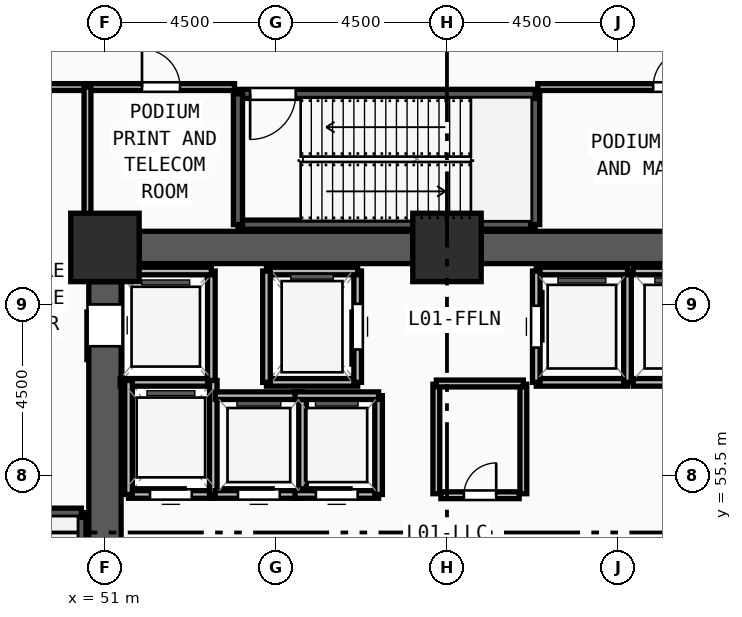
"""IFC4 building model, lengths in metres.
Left out: names, types, materials, properties, quantities, classifications, styles, units other than length and angle.
Written with IfcOpenShell. Run it as: python <this file> out.ifc"""

import sys

from ifc_helpers import new_model, si_unit, direction, frame, frame_2d, origin, origin_2d, place, context, subcontext, project, spatial, rectangle, extrude, source, transform, mapped, element, fill, save


model = new_model("IFC4")
c1 = context("Model", 3, precision=1e-05, world=origin(), true_north=direction((0.0, 1.0)))
c2 = subcontext(c1, "Body", "Model", "MODEL_VIEW")
j1 = project(units=[si_unit("LENGTHUNIT", "METRE"), si_unit("PLANEANGLEUNIT", "RADIAN")], contexts=[c1])
p1 = place(None, origin())
s1 = spatial("IfcSite", under=j1, at=p1, CompositionType="ELEMENT")
p2 = place(p1, origin())
s2 = spatial("IfcBuilding", under=s1, at=p2, CompositionType="ELEMENT")
p3 = place(p2, origin())
s3 = spatial("IfcBuildingStorey", under=s2, at=p3, CompositionType="ELEMENT", Elevation=0.0)
m1 = source(origin(), c2, "Body", "SweptSolid", [
    extrude(rectangle(XDim=1.8, YDim=1.8, at=origin_2d()), origin(), (0.0, 0.0, 1.0), 5.4),
])
for number, where, z_axis, x_axis in (
    (1, (60.0, 61.5, 0.0), (0.0, 0.0, 1.0), (1.0, 0.0, 0.0)),
    (2, (51.0, 61.5, 0.0), (0.0, 0.0, 1.0), (1.0, 0.0, 0.0)),
):
    element("IfcColumn", number, at=place(p3, frame(where, z_axis=z_axis, x_axis=x_axis)), inside=s3, PredefinedType="COLUMN", context=c2, shape_type="MappedRepresentation", body=[
        mapped(m1, transform((0.0, 0.0, 0.0), x_axis=(1.0, 0.0, 0.0), y_axis=(0.0, 1.0, 0.0), z_axis=(0.0, 0.0, 1.0), scale=1.0)),
    ])
for number, where, z_axis, x_axis in (
    (3, (51.9, 61.5, 0.0), (0.0, 0.0, 1.0), (1.0, 0.0, 0.0)),
    (4, (60.9, 61.5, 0.0), (0.0, 0.0, 1.0), (1.0, 0.0, 0.0)),
):
    element("IfcWall", number, at=place(p3, frame(where, z_axis=z_axis, x_axis=x_axis)), inside=s3, PredefinedType="SHEAR", context=c2, shape_type="SweptSolid", body=[
        extrude(rectangle(XDim=7.2, YDim=0.85, at=frame_2d((3.6, 0.0))), origin(), (0.0, 0.0, 1.0), 5.15),
    ])
p4 = place(p3, frame((51.0, 47.4, 0.0), z_axis=(0.0, 0.0, 1.0), x_axis=(0.0, 1.0, 0.0)))
e5 = element("IfcWall", 5, at=p4, inside=s3, PredefinedType="SHEAR", context=c2, shape_type="SweptSolid", body=[
    extrude(rectangle(XDim=13.2, YDim=0.85, at=frame_2d((6.6, 0.0))), origin(), (0.0, 0.0, 1.0), 5.15),
])
m2 = source(origin(), c2, "Body", "SweptSolid", [
    extrude(rectangle(XDim=1.1, YDim=2.2, at=frame_2d((0.55, 1.1))), frame((0.0, 0.435, 0.0), z_axis=(0.0, -1.0, 0.0), x_axis=(1.0, 0.0, 0.0)), (0.0, 0.0, 1.0), 0.87),
])
p5 = place(p4, frame((11.5, 0.0, 0.0)))
e6 = element("IfcOpeningElement", 6, at=p5, cuts=e5, PredefinedType="OPENING", context=c2, shape_type="MappedRepresentation", body=[
    mapped(m2, transform((0.0, 0.0, 0.0), x_axis=(1.0, 0.0, 0.0), y_axis=(0.0, 1.0, 0.0), z_axis=(0.0, 0.0, 1.0), scale=1.0)),
])
p6 = place(p3, frame((50.38, 46.7, 0.0), z_axis=(0.0, 0.0, 1.0), x_axis=(0.0, 1.0, 0.0)))
e7 = element("IfcWall", 7, at=p6, inside=s3, PredefinedType="SOLIDWALL", context=c2, shape_type="SweptSolid", body=[
    extrude(rectangle(XDim=7.82, YDim=0.24, at=frame_2d((3.91, 0.0))), origin(), (0.0, 0.0, 1.0), 5.15),
])
p7 = place(p3, frame((50.38, 54.52, 0.0), z_axis=(0.0, 0.0, 1.0), x_axis=(-1.0, 0.0, 0.0)))
e8 = element("IfcWall", 8, at=p7, inside=s3, PredefinedType="SOLIDWALL", context=c2, shape_type="SweptSolid", body=[
    extrude(rectangle(XDim=3.44, YDim=0.24, at=frame_2d((1.72, 0.0))), origin(), (0.0, 0.0, 1.0), 5.15),
])
p8 = place(p3, frame((54.5, 62.1, 0.0), z_axis=(0.0, 0.0, 1.0), x_axis=(1.0, 0.0, 0.0)))
e9 = element("IfcWall", 9, at=p8, inside=s3, PredefinedType="SOLIDWALL", context=c2, shape_type="SweptSolid", body=[
    extrude(rectangle(XDim=7.82, YDim=0.24, at=frame_2d((3.91, 0.0))), origin(), (0.0, 0.0, 1.0), 5.15),
])
p9 = place(p3, frame((62.32, 62.1, 0.0), z_axis=(0.0, 0.0, 1.0), x_axis=(0.0, 1.0, 0.0)))
e10 = element("IfcWall", 10, at=p9, inside=s3, PredefinedType="SOLIDWALL", context=c2, shape_type="SweptSolid", body=[
    extrude(rectangle(XDim=3.44, YDim=0.24, at=frame_2d((1.72, 0.0))), origin(), (0.0, 0.0, 1.0), 5.15),
])
p10 = place(p3, frame((62.32, 65.54, 0.0), z_axis=(0.0, 0.0, 1.0), x_axis=(-1.0, 0.0, 0.0)))
e11 = element("IfcWall", 11, at=p10, inside=s3, PredefinedType="SOLIDWALL", context=c2, shape_type="SweptSolid", body=[
    extrude(rectangle(XDim=7.82, YDim=0.24, at=frame_2d((3.91, 0.0))), origin(), (0.0, 0.0, 1.0), 5.15),
])
m3 = source(origin(), c2, "Body", "SweptSolid", [
    extrude(rectangle(XDim=1.2, YDim=2.2, at=frame_2d((0.6, 1.1))), frame((0.0, 0.13, 0.0), z_axis=(0.0, -1.0, 0.0), x_axis=(1.0, 0.0, 0.0)), (0.0, 0.0, 1.0), 0.26),
])
p11 = place(p10, frame((6.3, 0.0, 0.0)))
e12 = element("IfcOpeningElement", 12, at=p11, cuts=e11, PredefinedType="OPENING", context=c2, shape_type="MappedRepresentation", body=[
    mapped(m3, transform((0.0, 0.0, 0.0), x_axis=(1.0, 0.0, 0.0), y_axis=(0.0, 1.0, 0.0), z_axis=(0.0, 0.0, 1.0), scale=1.0)),
])
p12 = place(p3, frame((54.5, 65.54, 0.0), z_axis=(0.0, 0.0, 1.0), x_axis=(0.0, -1.0, 0.0)))
e13 = element("IfcWall", 13, at=p12, inside=s3, PredefinedType="SOLIDWALL", context=c2, shape_type="SweptSolid", body=[
    extrude(rectangle(XDim=3.44, YDim=0.24, at=frame_2d((1.72, 0.0))), origin(), (0.0, 0.0, 1.0), 5.15),
])
p13 = place(p3, frame((55.25, 57.95, 0.0), z_axis=(0.0, 0.0, 1.0), x_axis=(1.0, 0.0, 0.0)))
e14 = element("IfcWall", 14, at=p13, inside=s3, PredefinedType="SOLIDWALL", context=c2, shape_type="SweptSolid", body=[
    extrude(rectangle(XDim=2.4, YDim=0.2, at=frame_2d((1.2, 0.0))), origin(), (0.0, 0.0, 1.0), 5.15),
])
p14 = place(p3, frame((57.65, 57.95, 0.0), z_axis=(0.0, 0.0, 1.0), x_axis=(0.0, 1.0, 0.0)))
e15 = element("IfcWall", 15, at=p14, inside=s3, PredefinedType="SOLIDWALL", context=c2, shape_type="SweptSolid", body=[
    extrude(rectangle(XDim=2.93, YDim=0.2, at=frame_2d((1.465, 0.0))), origin(), (0.0, 0.0, 1.0), 5.15),
])
m4 = source(origin(), c2, "Body", "SweptSolid", [
    extrude(rectangle(XDim=1.2, YDim=2.3, at=frame_2d((0.6, 1.15))), frame((0.0, 0.11, 0.0), z_axis=(0.0, -1.0, 0.0), x_axis=(1.0, 0.0, 0.0)), (0.0, 0.0, 1.0), 0.22),
])
p15 = place(p14, frame((0.865, 0.0, 0.0)))
e16 = element("IfcOpeningElement", 16, at=p15, cuts=e15, PredefinedType="OPENING", context=c2, shape_type="MappedRepresentation", body=[
    mapped(m4, transform((0.0, 0.0, 0.0), x_axis=(1.0, 0.0, 0.0), y_axis=(0.0, 1.0, 0.0), z_axis=(0.0, 0.0, 1.0), scale=1.0)),
])
p16 = place(p3, frame((57.65, 60.88, 0.0), z_axis=(0.0, 0.0, 1.0), x_axis=(-1.0, 0.0, 0.0)))
e17 = element("IfcWall", 17, at=p16, inside=s3, PredefinedType="SOLIDWALL", context=c2, shape_type="SweptSolid", body=[
    extrude(rectangle(XDim=2.4, YDim=0.2, at=frame_2d((1.2, 0.0))), origin(), (0.0, 0.0, 1.0), 5.15),
])
p17 = place(p3, frame((55.25, 60.88, 0.0), z_axis=(0.0, 0.0, 1.0), x_axis=(0.0, -1.0, 0.0)))
e18 = element("IfcWall", 18, at=p17, inside=s3, PredefinedType="SOLIDWALL", context=c2, shape_type="SweptSolid", body=[
    extrude(rectangle(XDim=2.93, YDim=0.2, at=frame_2d((1.465, 0.0))), origin(), (0.0, 0.0, 1.0), 5.15),
])
p18 = place(p3, frame((62.35, 57.95, 0.0), z_axis=(0.0, 0.0, 1.0), x_axis=(1.0, 0.0, 0.0)))
e19 = element("IfcWall", 19, at=p18, inside=s3, PredefinedType="SOLIDWALL", context=c2, shape_type="SweptSolid", body=[
    extrude(rectangle(XDim=2.4, YDim=0.2, at=frame_2d((1.2, 0.0))), origin(), (0.0, 0.0, 1.0), 5.15),
])
p19 = place(p3, frame((64.75, 57.95, 0.0), z_axis=(0.0, 0.0, 1.0), x_axis=(0.0, 1.0, 0.0)))
e20 = element("IfcWall", 20, at=p19, inside=s3, PredefinedType="SOLIDWALL", context=c2, shape_type="SweptSolid", body=[
    extrude(rectangle(XDim=2.93, YDim=0.2, at=frame_2d((1.465, 0.0))), origin(), (0.0, 0.0, 1.0), 5.15),
])
p20 = place(p3, frame((64.75, 60.88, 0.0), z_axis=(0.0, 0.0, 1.0), x_axis=(-1.0, 0.0, 0.0)))
e21 = element("IfcWall", 21, at=p20, inside=s3, PredefinedType="SOLIDWALL", context=c2, shape_type="SweptSolid", body=[
    extrude(rectangle(XDim=2.4, YDim=0.2, at=frame_2d((1.2, 0.0))), origin(), (0.0, 0.0, 1.0), 5.15),
])
p21 = place(p3, frame((62.35, 60.88, 0.0), z_axis=(0.0, 0.0, 1.0), x_axis=(0.0, -1.0, 0.0)))
e22 = element("IfcWall", 22, at=p21, inside=s3, PredefinedType="SOLIDWALL", context=c2, shape_type="SweptSolid", body=[
    extrude(rectangle(XDim=2.93, YDim=0.2, at=frame_2d((1.465, 0.0))), origin(), (0.0, 0.0, 1.0), 5.15),
])
m5 = source(origin(), c2, "Body", "SweptSolid", [
    extrude(rectangle(XDim=1.1, YDim=2.2, at=frame_2d((0.55, 1.1))), frame((0.0, 0.11, 0.0), z_axis=(0.0, -1.0, 0.0), x_axis=(1.0, 0.0, 0.0)), (0.0, 0.0, 1.0), 0.22),
])
p22 = place(p21, frame((0.915, 0.0, 0.0)))
e23 = element("IfcOpeningElement", 23, at=p22, cuts=e22, PredefinedType="OPENING", context=c2, shape_type="MappedRepresentation", body=[
    mapped(m5, transform((0.0, 0.0, 0.0), x_axis=(1.0, 0.0, 0.0), y_axis=(0.0, 1.0, 0.0), z_axis=(0.0, 0.0, 1.0), scale=1.0)),
])
for number, where, z_axis, x_axis in (
    (24, (64.9, 57.95, 0.0), (0.0, 0.0, 1.0), (1.0, 0.0, 0.0)),
    (25, (67.3, 60.88, 0.0), (0.0, 0.0, 1.0), (-1.0, 0.0, 0.0)),
    (26, (51.4, 57.95, 0.0), (0.0, 0.0, 1.0), (1.0, 0.0, 0.0)),
):
    element("IfcWall", number, at=place(p3, frame(where, z_axis=z_axis, x_axis=x_axis)), inside=s3, PredefinedType="SOLIDWALL", context=c2, shape_type="SweptSolid", body=[
        extrude(rectangle(XDim=2.4, YDim=0.2, at=frame_2d((1.2, 0.0))), origin(), (0.0, 0.0, 1.0), 5.15),
    ])
p23 = place(p3, frame((53.8, 57.95, 0.0), z_axis=(0.0, 0.0, 1.0), x_axis=(0.0, 1.0, 0.0)))
e27 = element("IfcWall", 27, at=p23, inside=s3, PredefinedType="SOLIDWALL", context=c2, shape_type="SweptSolid", body=[
    extrude(rectangle(XDim=2.93, YDim=0.2, at=frame_2d((1.465, 0.0))), origin(), (0.0, 0.0, 1.0), 5.15),
])
p24 = place(p3, frame((53.8, 60.88, 0.0), z_axis=(0.0, 0.0, 1.0), x_axis=(-1.0, 0.0, 0.0)))
e28 = element("IfcWall", 28, at=p24, inside=s3, PredefinedType="SOLIDWALL", context=c2, shape_type="SweptSolid", body=[
    extrude(rectangle(XDim=2.4, YDim=0.2, at=frame_2d((1.2, 0.0))), origin(), (0.0, 0.0, 1.0), 5.15),
])
p25 = place(p3, frame((51.62, 55.0, 0.0), z_axis=(0.0, 0.0, 1.0), x_axis=(1.0, 0.0, 0.0)))
e29 = element("IfcWall", 29, at=p25, inside=s3, PredefinedType="SOLIDWALL", context=c2, shape_type="SweptSolid", body=[
    extrude(rectangle(XDim=2.23, YDim=0.2, at=frame_2d((1.115, 0.0))), origin(), (0.0, 0.0, 1.0), 5.15),
])
p26 = place(p25, frame((0.565, 0.0, 0.0)))
e30 = element("IfcOpeningElement", 30, at=p26, cuts=e29, PredefinedType="OPENING", context=c2, shape_type="MappedRepresentation", body=[
    mapped(m5, transform((0.0, 0.0, 0.0), x_axis=(1.0, 0.0, 0.0), y_axis=(0.0, 1.0, 0.0), z_axis=(0.0, 0.0, 1.0), scale=1.0)),
])
for number, where, z_axis, x_axis in (
    (31, (53.85, 55.0, 0.0), (0.0, 0.0, 1.0), (0.0, 1.0, 0.0)),
    (32, (51.62, 58.0, 0.0), (0.0, 0.0, 1.0), (0.0, -1.0, 0.0)),
):
    element("IfcWall", number, at=place(p3, frame(where, z_axis=z_axis, x_axis=x_axis)), inside=s3, PredefinedType="SOLIDWALL", context=c2, shape_type="SweptSolid", body=[
        extrude(rectangle(XDim=3.0, YDim=0.2, at=frame_2d((1.5, 0.0))), origin(), (0.0, 0.0, 1.0), 5.15),
    ])
p27 = place(p3, frame((53.9, 55.0, 0.0), z_axis=(0.0, 0.0, 1.0), x_axis=(1.0, 0.0, 0.0)))
e33 = element("IfcWall", 33, at=p27, inside=s3, PredefinedType="SOLIDWALL", context=c2, shape_type="SweptSolid", body=[
    extrude(rectangle(XDim=2.3, YDim=0.2, at=frame_2d((1.15, 0.0))), origin(), (0.0, 0.0, 1.0), 5.15),
])
p28 = place(p27, frame((0.6, 0.0, 0.0)))
e34 = element("IfcOpeningElement", 34, at=p28, cuts=e33, PredefinedType="OPENING", context=c2, shape_type="MappedRepresentation", body=[
    mapped(m5, transform((0.0, 0.0, 0.0), x_axis=(1.0, 0.0, 0.0), y_axis=(0.0, 1.0, 0.0), z_axis=(0.0, 0.0, 1.0), scale=1.0)),
])
p29 = place(p3, frame((56.2, 55.0, 0.0), z_axis=(0.0, 0.0, 1.0), x_axis=(0.0, 1.0, 0.0)))
e35 = element("IfcWall", 35, at=p29, inside=s3, PredefinedType="SOLIDWALL", context=c2, shape_type="SweptSolid", body=[
    extrude(rectangle(XDim=2.6, YDim=0.2, at=frame_2d((1.3, 0.0))), origin(), (0.0, 0.0, 1.0), 5.15),
])
p30 = place(p3, frame((56.2, 57.6, 0.0), z_axis=(0.0, 0.0, 1.0), x_axis=(-1.0, 0.0, 0.0)))
e36 = element("IfcWall", 36, at=p30, inside=s3, PredefinedType="SOLIDWALL", context=c2, shape_type="SweptSolid", body=[
    extrude(rectangle(XDim=2.3, YDim=0.2, at=frame_2d((1.15, 0.0))), origin(), (0.0, 0.0, 1.0), 5.15),
])
p31 = place(p3, frame((56.0, 55.0, 0.0), z_axis=(0.0, 0.0, 1.0), x_axis=(1.0, 0.0, 0.0)))
e37 = element("IfcWall", 37, at=p31, inside=s3, PredefinedType="SOLIDWALL", context=c2, shape_type="SweptSolid", body=[
    extrude(rectangle(XDim=2.2, YDim=0.2, at=frame_2d((1.1, 0.0))), origin(), (0.0, 0.0, 1.0), 5.15),
])
p32 = place(p31, frame((0.55, 0.0, 0.0)))
e38 = element("IfcOpeningElement", 38, at=p32, cuts=e37, PredefinedType="OPENING", context=c2, shape_type="MappedRepresentation", body=[
    mapped(m5, transform((0.0, 0.0, 0.0), x_axis=(1.0, 0.0, 0.0), y_axis=(0.0, 1.0, 0.0), z_axis=(0.0, 0.0, 1.0), scale=1.0)),
])
p33 = place(p3, frame((58.2, 55.0, 0.0), z_axis=(0.0, 0.0, 1.0), x_axis=(0.0, 1.0, 0.0)))
e39 = element("IfcWall", 39, at=p33, inside=s3, PredefinedType="SOLIDWALL", context=c2, shape_type="SweptSolid", body=[
    extrude(rectangle(XDim=2.6, YDim=0.2, at=frame_2d((1.3, 0.0))), origin(), (0.0, 0.0, 1.0), 5.15),
])
p34 = place(p3, frame((58.2, 57.6, 0.0), z_axis=(0.0, 0.0, 1.0), x_axis=(-1.0, 0.0, 0.0)))
e40 = element("IfcWall", 40, at=p34, inside=s3, PredefinedType="SOLIDWALL", context=c2, shape_type="SweptSolid", body=[
    extrude(rectangle(XDim=2.2, YDim=0.2, at=frame_2d((1.1, 0.0))), origin(), (0.0, 0.0, 1.0), 5.15),
])
p35 = place(p3, frame((59.84, 54.98, 0.0), z_axis=(0.0, 0.0, 1.0), x_axis=(1.0, 0.0, 0.0)))
e41 = element("IfcWall", 41, at=p35, inside=s3, PredefinedType="PARTITIONING", context=c2, shape_type="SweptSolid", body=[
    extrude(rectangle(XDim=2.06, YDim=0.18, at=frame_2d((1.03, 0.0))), origin(), (0.0, 0.0, 1.0), 5.15),
])
m6 = source(origin(), c2, "Body", "SweptSolid", [
    extrude(rectangle(XDim=0.85, YDim=2.1, at=frame_2d((0.425, 1.05))), frame((0.0, 0.1, 0.0), z_axis=(0.0, -1.0, 0.0), x_axis=(1.0, 0.0, 0.0)), (0.0, 0.0, 1.0), 0.2),
])
p36 = place(p35, frame((0.605, 0.0, 0.0)))
e42 = element("IfcOpeningElement", 42, at=p36, cuts=e41, PredefinedType="OPENING", context=c2, shape_type="MappedRepresentation", body=[
    mapped(m6, transform((0.0, 0.0, 0.0), x_axis=(1.0, 0.0, 0.0), y_axis=(0.0, 1.0, 0.0), z_axis=(0.0, 0.0, 1.0), scale=1.0)),
])
p37 = place(p3, frame((50.54, 65.72, 0.0), z_axis=(0.0, 0.0, 1.0), x_axis=(1.0, 0.0, 0.0)))
e43 = element("IfcWall", 43, at=p37, inside=s3, PredefinedType="PARTITIONING", context=c2, shape_type="SweptSolid", body=[
    extrude(rectangle(XDim=3.87, YDim=0.18, at=frame_2d((1.935, 0.0))), origin(), (0.0, 0.0, 1.0), 5.15),
])
m7 = source(origin(), c2, "Body", "SweptSolid", [
    extrude(rectangle(XDim=1.0, YDim=2.2, at=frame_2d((0.5, 1.1))), frame((0.0, 0.1, 0.0), z_axis=(0.0, -1.0, 0.0), x_axis=(1.0, 0.0, 0.0)), (0.0, 0.0, 1.0), 0.2),
])
p38 = place(p37, frame((1.435, 0.0, 0.0)))
e44 = element("IfcOpeningElement", 44, at=p38, cuts=e43, PredefinedType="OPENING", context=c2, shape_type="MappedRepresentation", body=[
    mapped(m7, transform((0.0, 0.0, 0.0), x_axis=(1.0, 0.0, 0.0), y_axis=(0.0, 1.0, 0.0), z_axis=(0.0, 0.0, 1.0), scale=1.0)),
])
p39 = place(p3, frame((62.39, 65.72, 0.0), z_axis=(0.0, 0.0, 1.0), x_axis=(1.0, 0.0, 0.0)))
e45 = element("IfcWall", 45, at=p39, inside=s3, PredefinedType="PARTITIONING", context=c2, shape_type="SweptSolid", body=[
    extrude(rectangle(XDim=7.07, YDim=0.18, at=frame_2d((3.535, 0.0))), origin(), (0.0, 0.0, 1.0), 5.15),
])
p40 = place(p39, frame((3.035, 0.0, 0.0)))
e46 = element("IfcOpeningElement", 46, at=p40, cuts=e45, PredefinedType="OPENING", context=c2, shape_type="MappedRepresentation", body=[
    mapped(m7, transform((0.0, 0.0, 0.0), x_axis=(1.0, 0.0, 0.0), y_axis=(0.0, 1.0, 0.0), z_axis=(0.0, 0.0, 1.0), scale=1.0)),
])
p41 = place(p3, frame((46.7, 65.72, 0.0), z_axis=(0.0, 0.0, 1.0), x_axis=(1.0, 0.0, 0.0)))
e47 = element("IfcWall", 47, at=p41, inside=s3, PredefinedType="PARTITIONING", context=c2, shape_type="SweptSolid", body=[
    extrude(rectangle(XDim=3.84, YDim=0.18, at=frame_2d((1.92, 0.0))), origin(), (0.0, 0.0, 1.0), 5.15),
])
m8 = source(origin(), c2, "Body", "SweptSolid", [
    extrude(rectangle(XDim=1.3, YDim=2.2, at=frame_2d((0.65, 1.1))), frame((0.0, 0.1, 0.0), z_axis=(0.0, -1.0, 0.0), x_axis=(1.0, 0.0, 0.0)), (0.0, 0.0, 1.0), 0.2),
])
p42 = place(p41, frame((1.27, 0.0, 0.0)))
e48 = element("IfcOpeningElement", 48, at=p42, cuts=e47, PredefinedType="OPENING", context=c2, shape_type="MappedRepresentation", body=[
    mapped(m8, transform((0.0, 0.0, 0.0), x_axis=(1.0, 0.0, 0.0), y_axis=(0.0, 1.0, 0.0), z_axis=(0.0, 0.0, 1.0), scale=1.0)),
])
for number, where, z_axis, x_axis in (
    (49, (59.72, 55.02, 0.0), (0.0, 0.0, 1.0), (0.0, 1.0, 0.0)),
    (50, (62.01, 55.02, 0.0), (0.0, 0.0, 1.0), (0.0, 1.0, 0.0)),
):
    element("IfcWall", number, at=place(p3, frame(where, z_axis=z_axis, x_axis=x_axis)), inside=s3, PredefinedType="PARTITIONING", context=c2, shape_type="SweptSolid", body=[
        extrude(rectangle(XDim=2.88, YDim=0.18, at=frame_2d((1.44, 0.0))), origin(), (0.0, 0.0, 1.0), 5.15),
    ])
p43 = place(p3, frame((59.72, 57.92, 0.0), z_axis=(0.0, 0.0, 1.0), x_axis=(1.0, 0.0, 0.0)))
e51 = element("IfcWall", 51, at=p43, inside=s3, PredefinedType="PARTITIONING", context=c2, shape_type="SweptSolid", body=[
    extrude(rectangle(XDim=2.29, YDim=0.18, at=frame_2d((1.145, 0.0))), origin(), (0.0, 0.0, 1.0), 5.15),
])
p44 = place(p3, frame((50.54, 61.95, 0.0), z_axis=(0.0, 0.0, 1.0), x_axis=(0.0, 1.0, 0.0)))
e52 = element("IfcWall", 52, at=p44, inside=s3, PredefinedType="PARTITIONING", context=c2, shape_type="SweptSolid", body=[
    extrude(rectangle(XDim=3.77, YDim=0.18, at=frame_2d((1.885, 0.0))), origin(), (0.0, 0.0, 1.0), 5.15),
])
m9 = source(origin(), c2, "Body", "SweptSolid", [
    extrude(rectangle(XDim=1.2, YDim=2.2, at=frame_2d((0.6, 1.1))), frame((0.0, 0.025, 0.0), z_axis=(0.0, -1.0, 0.0), x_axis=(1.0, 0.0, 0.0)), (0.0, 0.0, 1.0), 0.05),
])
p45 = place(p11, origin())
e53 = element("IfcDoor", 53, at=p45, inside=s3, OperationType="SINGLE_SWING_RIGHT", PredefinedType="DOOR", context=c2, shape_type="MappedRepresentation", body=[
    mapped(m9, transform((0.0, 0.0, 0.0), x_axis=(1.0, 0.0, 0.0), y_axis=(0.0, 1.0, 0.0), z_axis=(0.0, 0.0, 1.0), scale=1.0)),
])
fill(e12, e53)
m10 = source(origin(), c2, "Body", "SweptSolid", [
    extrude(rectangle(XDim=1.2, YDim=2.3, at=frame_2d((0.6, 1.15))), frame((0.0, 0.025, 0.0), z_axis=(0.0, -1.0, 0.0), x_axis=(1.0, 0.0, 0.0)), (0.0, 0.0, 1.0), 0.05),
])
p46 = place(p15, origin())
e54 = element("IfcDoor", 54, at=p46, inside=s3, OperationType="SLIDING_TO_LEFT", PredefinedType="DOOR", context=c2, shape_type="MappedRepresentation", body=[
    mapped(m10, transform((0.0, 0.0, 0.0), x_axis=(1.0, 0.0, 0.0), y_axis=(0.0, 1.0, 0.0), z_axis=(0.0, 0.0, 1.0), scale=1.0)),
])
fill(e16, e54)
m11 = source(origin(), c2, "Body", "SweptSolid", [
    extrude(rectangle(XDim=1.1, YDim=2.2, at=frame_2d((0.55, 1.1))), frame((0.0, 0.025, 0.0), z_axis=(0.0, -1.0, 0.0), x_axis=(1.0, 0.0, 0.0)), (0.0, 0.0, 1.0), 0.05),
])
p47 = place(p22, origin())
e55 = element("IfcDoor", 55, at=p47, inside=s3, OperationType="SLIDING_TO_LEFT", PredefinedType="DOOR", context=c2, shape_type="MappedRepresentation", body=[
    mapped(m11, transform((0.0, 0.0, 0.0), x_axis=(1.0, 0.0, 0.0), y_axis=(0.0, 1.0, 0.0), z_axis=(0.0, 0.0, 1.0), scale=1.0)),
])
fill(e23, e55)
p48 = place(p5, origin())
e56 = element("IfcDoor", 56, at=p48, inside=s3, OperationType="SLIDING_TO_LEFT", PredefinedType="DOOR", context=c2, shape_type="MappedRepresentation", body=[
    mapped(m11, transform((0.0, 0.0, 0.0), x_axis=(1.0, 0.0, 0.0), y_axis=(0.0, 1.0, 0.0), z_axis=(0.0, 0.0, 1.0), scale=1.0)),
])
fill(e6, e56)
p49 = place(p26, origin())
e57 = element("IfcDoor", 57, at=p49, inside=s3, OperationType="SLIDING_TO_LEFT", PredefinedType="DOOR", context=c2, shape_type="MappedRepresentation", body=[
    mapped(m11, transform((0.0, 0.0, 0.0), x_axis=(1.0, 0.0, 0.0), y_axis=(0.0, 1.0, 0.0), z_axis=(0.0, 0.0, 1.0), scale=1.0)),
])
fill(e30, e57)
p50 = place(p28, origin())
e58 = element("IfcDoor", 58, at=p50, inside=s3, OperationType="SLIDING_TO_LEFT", PredefinedType="DOOR", context=c2, shape_type="MappedRepresentation", body=[
    mapped(m11, transform((0.0, 0.0, 0.0), x_axis=(1.0, 0.0, 0.0), y_axis=(0.0, 1.0, 0.0), z_axis=(0.0, 0.0, 1.0), scale=1.0)),
])
fill(e34, e58)
p51 = place(p32, origin())
e59 = element("IfcDoor", 59, at=p51, inside=s3, OperationType="SLIDING_TO_LEFT", PredefinedType="DOOR", context=c2, shape_type="MappedRepresentation", body=[
    mapped(m11, transform((0.0, 0.0, 0.0), x_axis=(1.0, 0.0, 0.0), y_axis=(0.0, 1.0, 0.0), z_axis=(0.0, 0.0, 1.0), scale=1.0)),
])
fill(e38, e59)
m12 = source(origin(), c2, "Body", "SweptSolid", [
    extrude(rectangle(XDim=0.85, YDim=2.1, at=frame_2d((0.425, 1.05))), frame((0.0, 0.025, 0.0), z_axis=(0.0, -1.0, 0.0), x_axis=(1.0, 0.0, 0.0)), (0.0, 0.0, 1.0), 0.05),
])
p52 = place(p36, origin())
e60 = element("IfcDoor", 60, at=p52, inside=s3, OperationType="SINGLE_SWING_RIGHT", PredefinedType="DOOR", context=c2, shape_type="MappedRepresentation", body=[
    mapped(m12, transform((0.0, 0.0, 0.0), x_axis=(1.0, 0.0, 0.0), y_axis=(0.0, 1.0, 0.0), z_axis=(0.0, 0.0, 1.0), scale=1.0)),
])
fill(e42, e60)
m13 = source(origin(), c2, "Body", "SweptSolid", [
    extrude(rectangle(XDim=1.0, YDim=2.2, at=frame_2d((0.5, 1.1))), frame((0.0, 0.025, 0.0), z_axis=(0.0, -1.0, 0.0), x_axis=(1.0, 0.0, 0.0)), (0.0, 0.0, 1.0), 0.05),
])
p53 = place(p38, origin())
e61 = element("IfcDoor", 61, at=p53, inside=s3, OperationType="SINGLE_SWING_LEFT", PredefinedType="DOOR", context=c2, shape_type="MappedRepresentation", body=[
    mapped(m13, transform((0.0, 0.0, 0.0), x_axis=(1.0, 0.0, 0.0), y_axis=(0.0, 1.0, 0.0), z_axis=(0.0, 0.0, 1.0), scale=1.0)),
])
fill(e44, e61)
p54 = place(p40, origin())
e62 = element("IfcDoor", 62, at=p54, inside=s3, OperationType="SINGLE_SWING_RIGHT", PredefinedType="DOOR", context=c2, shape_type="MappedRepresentation", body=[
    mapped(m13, transform((0.0, 0.0, 0.0), x_axis=(1.0, 0.0, 0.0), y_axis=(0.0, 1.0, 0.0), z_axis=(0.0, 0.0, 1.0), scale=1.0)),
])
fill(e46, e62)
save(model, sys.argv[1])
